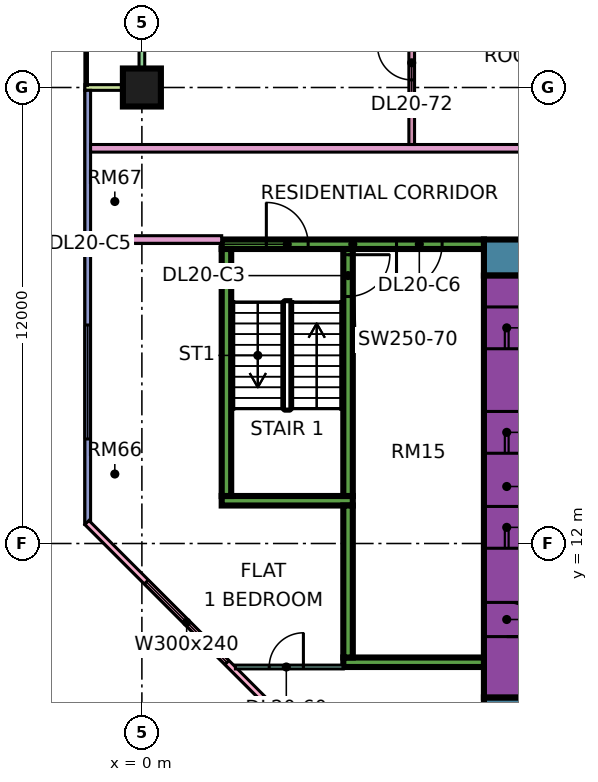
"""IFC4 building model, lengths in metres.
Left out: names, types, materials, properties, quantities, classifications, styles, units other than length and angle.
Written with IfcOpenShell. Run it as: python <this file> out.ifc"""

import sys

from ifc_helpers import new_model, si_unit, direction, frame, frame_2d, origin, origin_2d, place, context, subcontext, project, spatial, rectangle, extrude, element, fill, save


model = new_model("IFC4")
c1 = context("Model", 3, precision=1e-05, world=origin(), true_north=direction((0.0, 1.0)))
c2 = subcontext(c1, "Body", "Model", "MODEL_VIEW")
j1 = project(units=[si_unit("LENGTHUNIT", "METRE"), si_unit("PLANEANGLEUNIT", "RADIAN")], contexts=[c1])
p1 = place(None, origin())
s1 = spatial("IfcSite", under=j1, at=p1, CompositionType="ELEMENT")
p2 = place(p1, origin())
s2 = spatial("IfcBuilding", under=s1, at=p2, CompositionType="ELEMENT")
p3 = place(p2, frame((0.0, 0.0, 91.9)))
s3 = spatial("IfcBuildingStorey", under=s2, at=p3, CompositionType="ELEMENT", Elevation=91.9)
p4 = place(p3, frame((0.0, 24.0, 0.0), z_axis=(0.0, 0.0, 1.0), x_axis=(1.0, 0.0, 0.0)))
e1 = element("IfcColumn", 1, at=p4, inside=s3, PredefinedType="COLUMN", context=c2, shape_type="SweptSolid", body=[
    extrude(rectangle(XDim=1.0, YDim=1.0, at=origin_2d()), origin(), (0.0, 0.0, 1.0), 3.75),
])
p5 = place(p3, frame((9.0, 7.475, 0.0), z_axis=(0.0, 0.0, 1.0), x_axis=(1.0, 0.0, 0.0)))
e2 = element("IfcWall", 2, at=p5, inside=s3, PredefinedType="SHEAR", context=c2, shape_type="SweptSolid", body=[
    extrude(rectangle(XDim=25.0, YDim=0.95, at=frame_2d((12.5, 0.0))), origin(), (0.0, 0.0, 1.0), 3.75),
])
p6 = place(p3, frame((9.0, 19.525, 0.0), z_axis=(0.0, 0.0, 1.0), x_axis=(1.0, 0.0, 0.0)))
e3 = element("IfcWall", 3, at=p6, inside=s3, PredefinedType="SHEAR", context=c2, shape_type="SweptSolid", body=[
    extrude(rectangle(XDim=25.0, YDim=0.95, at=frame_2d((12.5, 0.0))), origin(), (0.0, 0.0, 1.0), 3.75),
])
p7 = place(p6, frame((19.1, 0.0, 0.0)))
e4 = element("IfcOpeningElement", 4, at=p7, cuts=e3, PredefinedType="OPENING", context=c2, shape_type="SweptSolid", body=[
    extrude(rectangle(XDim=1.8, YDim=2.4, at=frame_2d((0.9, 1.2))), frame((0.0, 0.485, 0.0), z_axis=(0.0, -1.0, 0.0), x_axis=(1.0, 0.0, 0.0)), (0.0, 0.0, 1.0), 0.97),
])
p8 = place(p3, frame((9.6, 7.95, 0.0), z_axis=(0.0, 0.0, 1.0), x_axis=(0.0, 1.0, 0.0)))
e5 = element("IfcWall", 5, at=p8, inside=s3, PredefinedType="SHEAR", context=c2, shape_type="SweptSolid", body=[
    extrude(rectangle(XDim=11.1, YDim=1.2, at=frame_2d((5.55, 0.0))), origin(), (0.0, 0.0, 1.0), 3.75),
])
p9 = place(p8, frame((3.925, 0.0, 0.0)))
e6 = element("IfcOpeningElement", 6, at=p9, cuts=e5, PredefinedType="OPENING", context=c2, shape_type="SweptSolid", body=[
    extrude(rectangle(XDim=1.1, YDim=2.2, at=frame_2d((0.55, 1.1))), frame((0.0, 0.61, 0.0), z_axis=(0.0, -1.0, 0.0), x_axis=(1.0, 0.0, 0.0)), (0.0, 0.0, 1.0), 1.22),
])
p10 = place(p8, frame((6.425, 0.0, 0.0)))
e7 = element("IfcOpeningElement", 7, at=p10, cuts=e5, PredefinedType="OPENING", context=c2, shape_type="SweptSolid", body=[
    extrude(rectangle(XDim=1.1, YDim=2.2, at=frame_2d((0.55, 1.1))), frame((0.0, 0.61, 0.0), z_axis=(0.0, -1.0, 0.0), x_axis=(1.0, 0.0, 0.0)), (0.0, 0.0, 1.0), 1.22),
])
p11 = place(p8, frame((9.175, 0.0, 0.0)))
e8 = element("IfcOpeningElement", 8, at=p11, cuts=e5, PredefinedType="OPENING", context=c2, shape_type="SweptSolid", body=[
    extrude(rectangle(XDim=1.1, YDim=2.2, at=frame_2d((0.55, 1.1))), frame((0.0, 0.61, 0.0), z_axis=(0.0, -1.0, 0.0), x_axis=(1.0, 0.0, 0.0)), (0.0, 0.0, 1.0), 1.22),
])
p12 = place(p8, frame((1.6, 0.0, 0.0)))
e9 = element("IfcOpeningElement", 9, at=p12, cuts=e5, PredefinedType="OPENING", context=c2, shape_type="SweptSolid", body=[
    extrude(rectangle(XDim=0.9, YDim=2.1, at=frame_2d((0.45, 1.05))), frame((0.0, 0.61, 0.0), z_axis=(0.0, -1.0, 0.0), x_axis=(1.0, 0.0, 0.0)), (0.0, 0.0, 1.0), 1.22),
])
p13 = place(p3, frame((2.1, 19.875, 0.0), z_axis=(0.0, 0.0, 1.0), x_axis=(1.0, 0.0, 0.0)))
e10 = element("IfcWall", 10, at=p13, inside=s3, PredefinedType="SHEAR", context=c2, shape_type="SweptSolid", body=[
    extrude(rectangle(XDim=6.9, YDim=0.25, at=frame_2d((3.45, 0.0))), origin(), (0.0, 0.0, 1.0), 3.75),
])
p14 = place(p13, frame((1.175, 0.0, 0.0)))
e11 = element("IfcOpeningElement", 11, at=p14, cuts=e10, PredefinedType="OPENING", context=c2, shape_type="SweptSolid", body=[
    extrude(rectangle(XDim=1.1, YDim=2.2, at=frame_2d((0.55, 1.1))), frame((0.0, 0.135, 0.0), z_axis=(0.0, -1.0, 0.0), x_axis=(1.0, 0.0, 0.0)), (0.0, 0.0, 1.0), 0.27),
])
p15 = place(p13, frame((4.6, 0.0, 0.0)))
e12 = element("IfcOpeningElement", 12, at=p15, cuts=e10, PredefinedType="OPENING", context=c2, shape_type="SweptSolid", body=[
    extrude(rectangle(XDim=1.2, YDim=2.2, at=frame_2d((0.6, 1.1))), frame((0.0, 0.135, 0.0), z_axis=(0.0, -1.0, 0.0), x_axis=(1.0, 0.0, 0.0)), (0.0, 0.0, 1.0), 0.27),
])
p16 = place(p3, frame((2.1, 13.125, 0.0), z_axis=(0.0, 0.0, 1.0), x_axis=(1.0, 0.0, 0.0)))
e13 = element("IfcWall", 13, at=p16, inside=s3, PredefinedType="SHEAR", context=c2, shape_type="SweptSolid", body=[
    extrude(rectangle(XDim=3.45, YDim=0.25, at=frame_2d((1.725, 0.0))), origin(), (0.0, 0.0, 1.0), 3.75),
])
p17 = place(p3, frame((2.225, 13.25, 0.0), z_axis=(0.0, 0.0, 1.0), x_axis=(0.0, 1.0, 0.0)))
e14 = element("IfcWall", 14, at=p17, inside=s3, PredefinedType="SHEAR", context=c2, shape_type="SweptSolid", body=[
    extrude(rectangle(XDim=6.5, YDim=0.25, at=frame_2d((3.25, 0.0))), origin(), (0.0, 0.0, 1.0), 3.75),
])
p18 = place(p3, frame((5.425, 13.25, 0.0), z_axis=(0.0, 0.0, 1.0), x_axis=(0.0, 1.0, 0.0)))
e15 = element("IfcWall", 15, at=p18, inside=s3, PredefinedType="SHEAR", context=c2, shape_type="SweptSolid", body=[
    extrude(rectangle(XDim=6.5, YDim=0.25, at=frame_2d((3.25, 0.0))), origin(), (0.0, 0.0, 1.0), 3.75),
])
p19 = place(p18, frame((5.25, 0.0, 0.0)))
e16 = element("IfcOpeningElement", 16, at=p19, cuts=e15, PredefinedType="OPENING", context=c2, shape_type="SweptSolid", body=[
    extrude(rectangle(XDim=1.1, YDim=2.2, at=frame_2d((0.55, 1.1))), frame((0.0, 0.135, 0.0), z_axis=(0.0, -1.0, 0.0), x_axis=(1.0, 0.0, 0.0)), (0.0, 0.0, 1.0), 0.27),
])
p20 = place(p3, frame((5.3, 8.875, 0.0), z_axis=(0.0, 0.0, 1.0), x_axis=(1.0, 0.0, 0.0)))
e17 = element("IfcWall", 17, at=p20, inside=s3, PredefinedType="SHEAR", context=c2, shape_type="SweptSolid", body=[
    extrude(rectangle(XDim=3.7, YDim=0.25, at=frame_2d((1.85, 0.0))), origin(), (0.0, 0.0, 1.0), 3.75),
])
p21 = place(p3, frame((5.425, 9.0, 0.0), z_axis=(0.0, 0.0, 1.0), x_axis=(0.0, 1.0, 0.0)))
e18 = element("IfcWall", 18, at=p21, inside=s3, PredefinedType="SHEAR", context=c2, shape_type="SweptSolid", body=[
    extrude(rectangle(XDim=4.0, YDim=0.25, at=frame_2d((2.0, 0.0))), origin(), (0.0, 0.0, 1.0), 3.75),
])
p22 = place(p3, frame((0.0, 35.925, 0.0), z_axis=(0.0, 0.0, 1.0), x_axis=(0.0, -1.0, 0.0)))
e19 = element("IfcWall", 19, at=p22, inside=s3, PredefinedType="SOLIDWALL", context=c2, shape_type="SweptSolid", body=[
    extrude(rectangle(XDim=11.85, YDim=0.15, at=frame_2d((5.925, 0.0))), origin(), (0.0, 0.0, 1.0), 3.35),
])
p23 = place(p22, frame((2.325, 0.0, 0.0)))
e20 = element("IfcOpeningElement", 20, at=p23, cuts=e19, PredefinedType="OPENING", context=c2, shape_type="SweptSolid", body=[
    extrude(rectangle(XDim=1.8, YDim=2.4, at=frame_2d((0.9, 1.2))), frame((0.0, 0.085, 0.0), z_axis=(0.0, -1.0, 0.0), x_axis=(1.0, 0.0, 0.0)), (0.0, 0.0, 1.0), 0.17),
])
p24 = place(p22, frame((7.125, 0.0, 0.45)))
e21 = element("IfcOpeningElement", 21, at=p24, cuts=e19, PredefinedType="OPENING", context=c2, shape_type="SweptSolid", body=[
    extrude(rectangle(XDim=3.0, YDim=2.4, at=frame_2d((1.5, 1.2))), frame((0.0, 0.085, 0.0), z_axis=(0.0, -1.0, 0.0), x_axis=(1.0, 0.0, 0.0)), (0.0, 0.0, 1.0), 0.17),
])
p25 = place(p3, frame((-1.5, 24.0, 0.0), z_axis=(0.0, 0.0, 1.0), x_axis=(1.0, 0.0, 0.0)))
e22 = element("IfcWall", 22, at=p25, inside=s3, PredefinedType="SOLIDWALL", context=c2, shape_type="SweptSolid", body=[
    extrude(rectangle(XDim=1.5, YDim=0.15, at=frame_2d((0.75, 0.0))), origin(), (0.0, 0.0, 1.0), 3.35),
])
p26 = place(p3, frame((-1.425, 23.925, 0.0), z_axis=(0.0, 0.0, 1.0), x_axis=(0.0, -1.0, 0.0)))
e23 = element("IfcWall", 23, at=p26, inside=s3, PredefinedType="SOLIDWALL", context=c2, shape_type="SweptSolid", body=[
    extrude(rectangle(XDim=11.425, YDim=0.15, at=frame_2d((5.712, 0.0))), origin(), (0.0, 0.0, 1.0), 3.35),
])
p27 = place(p26, frame((6.175, 0.0, 0.45)))
e24 = element("IfcOpeningElement", 24, at=p27, cuts=e23, PredefinedType="OPENING", context=c2, shape_type="SweptSolid", body=[
    extrude(rectangle(XDim=3.0, YDim=2.4, at=frame_2d((1.5, 1.2))), frame((0.0, 0.085, 0.0), z_axis=(0.0, -1.0, 0.0), x_axis=(1.0, 0.0, 0.0)), (0.0, 0.0, 1.0), 0.17),
])
p28 = place(p3, frame((-1.447, 12.553, 0.0), z_axis=(0.0, 0.0, 1.0), x_axis=(0.707106781187, -0.707106781187, 0.0)))
e25 = element("IfcWall", 25, at=p28, inside=s3, PredefinedType="SOLIDWALL", context=c2, shape_type="SweptSolid", body=[
    extrude(rectangle(XDim=19.799, YDim=0.15, at=frame_2d((9.899, 0.0))), origin(), (0.0, 0.0, 1.0), 3.35),
])
p29 = place(p28, frame((2.212, 0.0, 0.45)))
e26 = element("IfcOpeningElement", 26, at=p29, cuts=e25, PredefinedType="OPENING", context=c2, shape_type="SweptSolid", body=[
    extrude(rectangle(XDim=3.0, YDim=2.4, at=frame_2d((1.5, 1.2))), frame((0.0, 0.085, 0.0), z_axis=(0.0, -1.0, 0.0), x_axis=(1.0, 0.0, 0.0)), (0.0, 0.0, 1.0), 0.17),
])
p30 = place(p28, frame((10.216, 0.0, 0.45)))
e27 = element("IfcOpeningElement", 27, at=p30, cuts=e25, PredefinedType="OPENING", context=c2, shape_type="SweptSolid", body=[
    extrude(rectangle(XDim=3.0, YDim=2.4, at=frame_2d((1.5, 1.2))), frame((0.0, 0.085, 0.0), z_axis=(0.0, -1.0, 0.0), x_axis=(1.0, 0.0, 0.0)), (0.0, 0.0, 1.0), 0.17),
])
p31 = place(p3, frame((-1.35, 20.0, 0.0), z_axis=(0.0, 0.0, 1.0), x_axis=(1.0, 0.0, 0.0)))
e28 = element("IfcWall", 28, at=p31, inside=s3, PredefinedType="PARTITIONING", context=c2, shape_type="SweptSolid", body=[
    extrude(rectangle(XDim=3.45, YDim=0.2, at=frame_2d((1.725, 0.0))), origin(), (0.0, 0.0, 1.0), 3.35),
])
p32 = place(p3, frame((-1.35, 22.4, 0.0), z_axis=(0.0, 0.0, 1.0), x_axis=(1.0, 0.0, 0.0)))
e29 = element("IfcWall", 29, at=p32, inside=s3, PredefinedType="PARTITIONING", context=c2, shape_type="SweptSolid", body=[
    extrude(rectangle(XDim=13.75, YDim=0.2, at=frame_2d((6.875, 0.0))), origin(), (0.0, 0.0, 1.0), 3.35),
])
p33 = place(p3, frame((2.461, 8.75, 0.0), z_axis=(0.0, 0.0, 1.0), x_axis=(1.0, 0.0, 0.0)))
e30 = element("IfcWall", 30, at=p33, inside=s3, PredefinedType="PARTITIONING", context=c2, shape_type="SweptSolid", body=[
    extrude(rectangle(XDim=2.839, YDim=0.1, at=frame_2d((1.419, 0.0))), origin(), (0.0, 0.0, 1.0), 3.35),
])
p34 = place(p33, frame((0.889, 0.0, 0.0)))
e31 = element("IfcOpeningElement", 31, at=p34, cuts=e30, PredefinedType="OPENING", context=c2, shape_type="SweptSolid", body=[
    extrude(rectangle(XDim=0.9, YDim=2.1, at=frame_2d((0.45, 1.05))), frame((0.0, 0.06, 0.0), z_axis=(0.0, -1.0, 0.0), x_axis=(1.0, 0.0, 0.0)), (0.0, 0.0, 1.0), 0.12),
])
p35 = place(p3, frame((7.1, 22.5, 0.0), z_axis=(0.0, 0.0, 1.0), x_axis=(0.0, 1.0, 0.0)))
e32 = element("IfcWall", 32, at=p35, inside=s3, PredefinedType="PARTITIONING", context=c2, shape_type="SweptSolid", body=[
    extrude(rectangle(XDim=7.275, YDim=0.15, at=frame_2d((3.637, 0.0))), origin(), (0.0, 0.0, 1.0), 3.35),
])
p36 = place(p35, frame((5.4, 0.0, 0.0)))
e33 = element("IfcOpeningElement", 33, at=p36, cuts=e32, PredefinedType="OPENING", context=c2, shape_type="SweptSolid", body=[
    extrude(rectangle(XDim=0.8, YDim=2.1, at=frame_2d((0.4, 1.05))), frame((0.0, 0.085, 0.0), z_axis=(0.0, -1.0, 0.0), x_axis=(1.0, 0.0, 0.0)), (0.0, 0.0, 1.0), 0.17),
])
p37 = place(p35, frame((1.7, 0.0, 0.0)))
e34 = element("IfcOpeningElement", 34, at=p37, cuts=e32, PredefinedType="OPENING", context=c2, shape_type="SweptSolid", body=[
    extrude(rectangle(XDim=0.9, YDim=2.1, at=frame_2d((0.45, 1.05))), frame((0.0, 0.085, 0.0), z_axis=(0.0, -1.0, 0.0), x_axis=(1.0, 0.0, 0.0)), (0.0, 0.0, 1.0), 0.17),
])
p38 = place(p27, origin())
e35 = element("IfcWindow", 35, at=p38, inside=s3, PartitioningType="SINGLE_PANEL", PredefinedType="WINDOW", context=c2, shape_type="SweptSolid", body=[
    extrude(rectangle(XDim=3.0, YDim=2.4, at=frame_2d((1.5, 1.2))), frame((0.0, 0.03, 0.0), z_axis=(0.0, -1.0, 0.0), x_axis=(1.0, 0.0, 0.0)), (0.0, 0.0, 1.0), 0.06),
])
fill(e24, e35)
p39 = place(p29, origin())
e36 = element("IfcWindow", 36, at=p39, inside=s3, PartitioningType="SINGLE_PANEL", PredefinedType="WINDOW", context=c2, shape_type="SweptSolid", body=[
    extrude(rectangle(XDim=3.0, YDim=2.4, at=frame_2d((1.5, 1.2))), frame((0.0, 0.03, 0.0), z_axis=(0.0, -1.0, 0.0), x_axis=(1.0, 0.0, 0.0)), (0.0, 0.0, 1.0), 0.06),
])
fill(e26, e36)
p40 = place(p9, origin())
e37 = element("IfcDoor", 37, at=p40, inside=s3, OperationType="DOUBLE_DOOR_SLIDING", PredefinedType="DOOR", context=c2, shape_type="SweptSolid", body=[
    extrude(rectangle(XDim=1.1, YDim=2.2, at=frame_2d((0.55, 1.1))), frame((0.0, 0.025, 0.0), z_axis=(0.0, -1.0, 0.0), x_axis=(1.0, 0.0, 0.0)), (0.0, 0.0, 1.0), 0.05),
])
fill(e6, e37)
p41 = place(p10, origin())
e38 = element("IfcDoor", 38, at=p41, inside=s3, OperationType="DOUBLE_DOOR_SLIDING", PredefinedType="DOOR", context=c2, shape_type="SweptSolid", body=[
    extrude(rectangle(XDim=1.1, YDim=2.2, at=frame_2d((0.55, 1.1))), frame((0.0, 0.025, 0.0), z_axis=(0.0, -1.0, 0.0), x_axis=(1.0, 0.0, 0.0)), (0.0, 0.0, 1.0), 0.05),
])
fill(e7, e38)
p42 = place(p11, origin())
e39 = element("IfcDoor", 39, at=p42, inside=s3, OperationType="DOUBLE_DOOR_SLIDING", PredefinedType="DOOR", context=c2, shape_type="SweptSolid", body=[
    extrude(rectangle(XDim=1.1, YDim=2.2, at=frame_2d((0.55, 1.1))), frame((0.0, 0.025, 0.0), z_axis=(0.0, -1.0, 0.0), x_axis=(1.0, 0.0, 0.0)), (0.0, 0.0, 1.0), 0.05),
])
fill(e8, e39)
p43 = place(p19, origin())
e40 = element("IfcDoor", 40, at=p43, inside=s3, OperationType="SINGLE_SWING_RIGHT", PredefinedType="DOOR", context=c2, shape_type="SweptSolid", body=[
    extrude(rectangle(XDim=1.1, YDim=2.2, at=frame_2d((0.55, 1.1))), frame((0.0, 0.025, 0.0), z_axis=(0.0, -1.0, 0.0), x_axis=(1.0, 0.0, 0.0)), (0.0, 0.0, 1.0), 0.05),
])
fill(e16, e40)
p44 = place(p12, frame((0.9, 0.0, 0.0), z_axis=(0.0, 0.0, 1.0), x_axis=(-1.0, 0.0, 0.0)))
e41 = element("IfcDoor", 41, at=p44, inside=s3, OperationType="SINGLE_SWING_LEFT", PredefinedType="DOOR", context=c2, shape_type="SweptSolid", body=[
    extrude(rectangle(XDim=0.9, YDim=2.1, at=frame_2d((0.45, 1.05))), frame((0.0, 0.025, 0.0), z_axis=(0.0, -1.0, 0.0), x_axis=(1.0, 0.0, 0.0)), (0.0, 0.0, 1.0), 0.05),
])
fill(e9, e41)
p45 = place(p14, origin())
e42 = element("IfcDoor", 42, at=p45, inside=s3, OperationType="SINGLE_SWING_LEFT", PredefinedType="DOOR", context=c2, shape_type="SweptSolid", body=[
    extrude(rectangle(XDim=1.1, YDim=2.2, at=frame_2d((0.55, 1.1))), frame((0.0, 0.025, 0.0), z_axis=(0.0, -1.0, 0.0), x_axis=(1.0, 0.0, 0.0)), (0.0, 0.0, 1.0), 0.05),
])
fill(e11, e42)
p46 = place(p15, frame((1.2, 0.0, 0.0), z_axis=(0.0, 0.0, 1.0), x_axis=(-1.0, 0.0, 0.0)))
e43 = element("IfcDoor", 43, at=p46, inside=s3, OperationType="SINGLE_SWING_LEFT", PredefinedType="DOOR", context=c2, shape_type="SweptSolid", body=[
    extrude(rectangle(XDim=1.2, YDim=2.2, at=frame_2d((0.6, 1.1))), frame((0.0, 0.025, 0.0), z_axis=(0.0, -1.0, 0.0), x_axis=(1.0, 0.0, 0.0)), (0.0, 0.0, 1.0), 0.05),
])
fill(e12, e43)
p47 = place(p34, frame((0.9, 0.0, 0.0), z_axis=(0.0, 0.0, 1.0), x_axis=(-1.0, 0.0, 0.0)))
e44 = element("IfcDoor", 44, at=p47, inside=s3, OperationType="SINGLE_SWING_RIGHT", PredefinedType="DOOR", context=c2, shape_type="SweptSolid", body=[
    extrude(rectangle(XDim=0.9, YDim=2.1, at=frame_2d((0.45, 1.05))), frame((0.0, 0.025, 0.0), z_axis=(0.0, -1.0, 0.0), x_axis=(1.0, 0.0, 0.0)), (0.0, 0.0, 1.0), 0.05),
])
fill(e31, e44)
p48 = place(p37, frame((0.9, 0.0, 0.0), z_axis=(0.0, 0.0, 1.0), x_axis=(-1.0, 0.0, 0.0)))
e45 = element("IfcDoor", 45, at=p48, inside=s3, OperationType="SINGLE_SWING_RIGHT", PredefinedType="DOOR", context=c2, shape_type="SweptSolid", body=[
    extrude(rectangle(XDim=0.9, YDim=2.1, at=frame_2d((0.45, 1.05))), frame((0.0, 0.025, 0.0), z_axis=(0.0, -1.0, 0.0), x_axis=(1.0, 0.0, 0.0)), (0.0, 0.0, 1.0), 0.05),
])
fill(e34, e45)
save(model, sys.argv[1])
